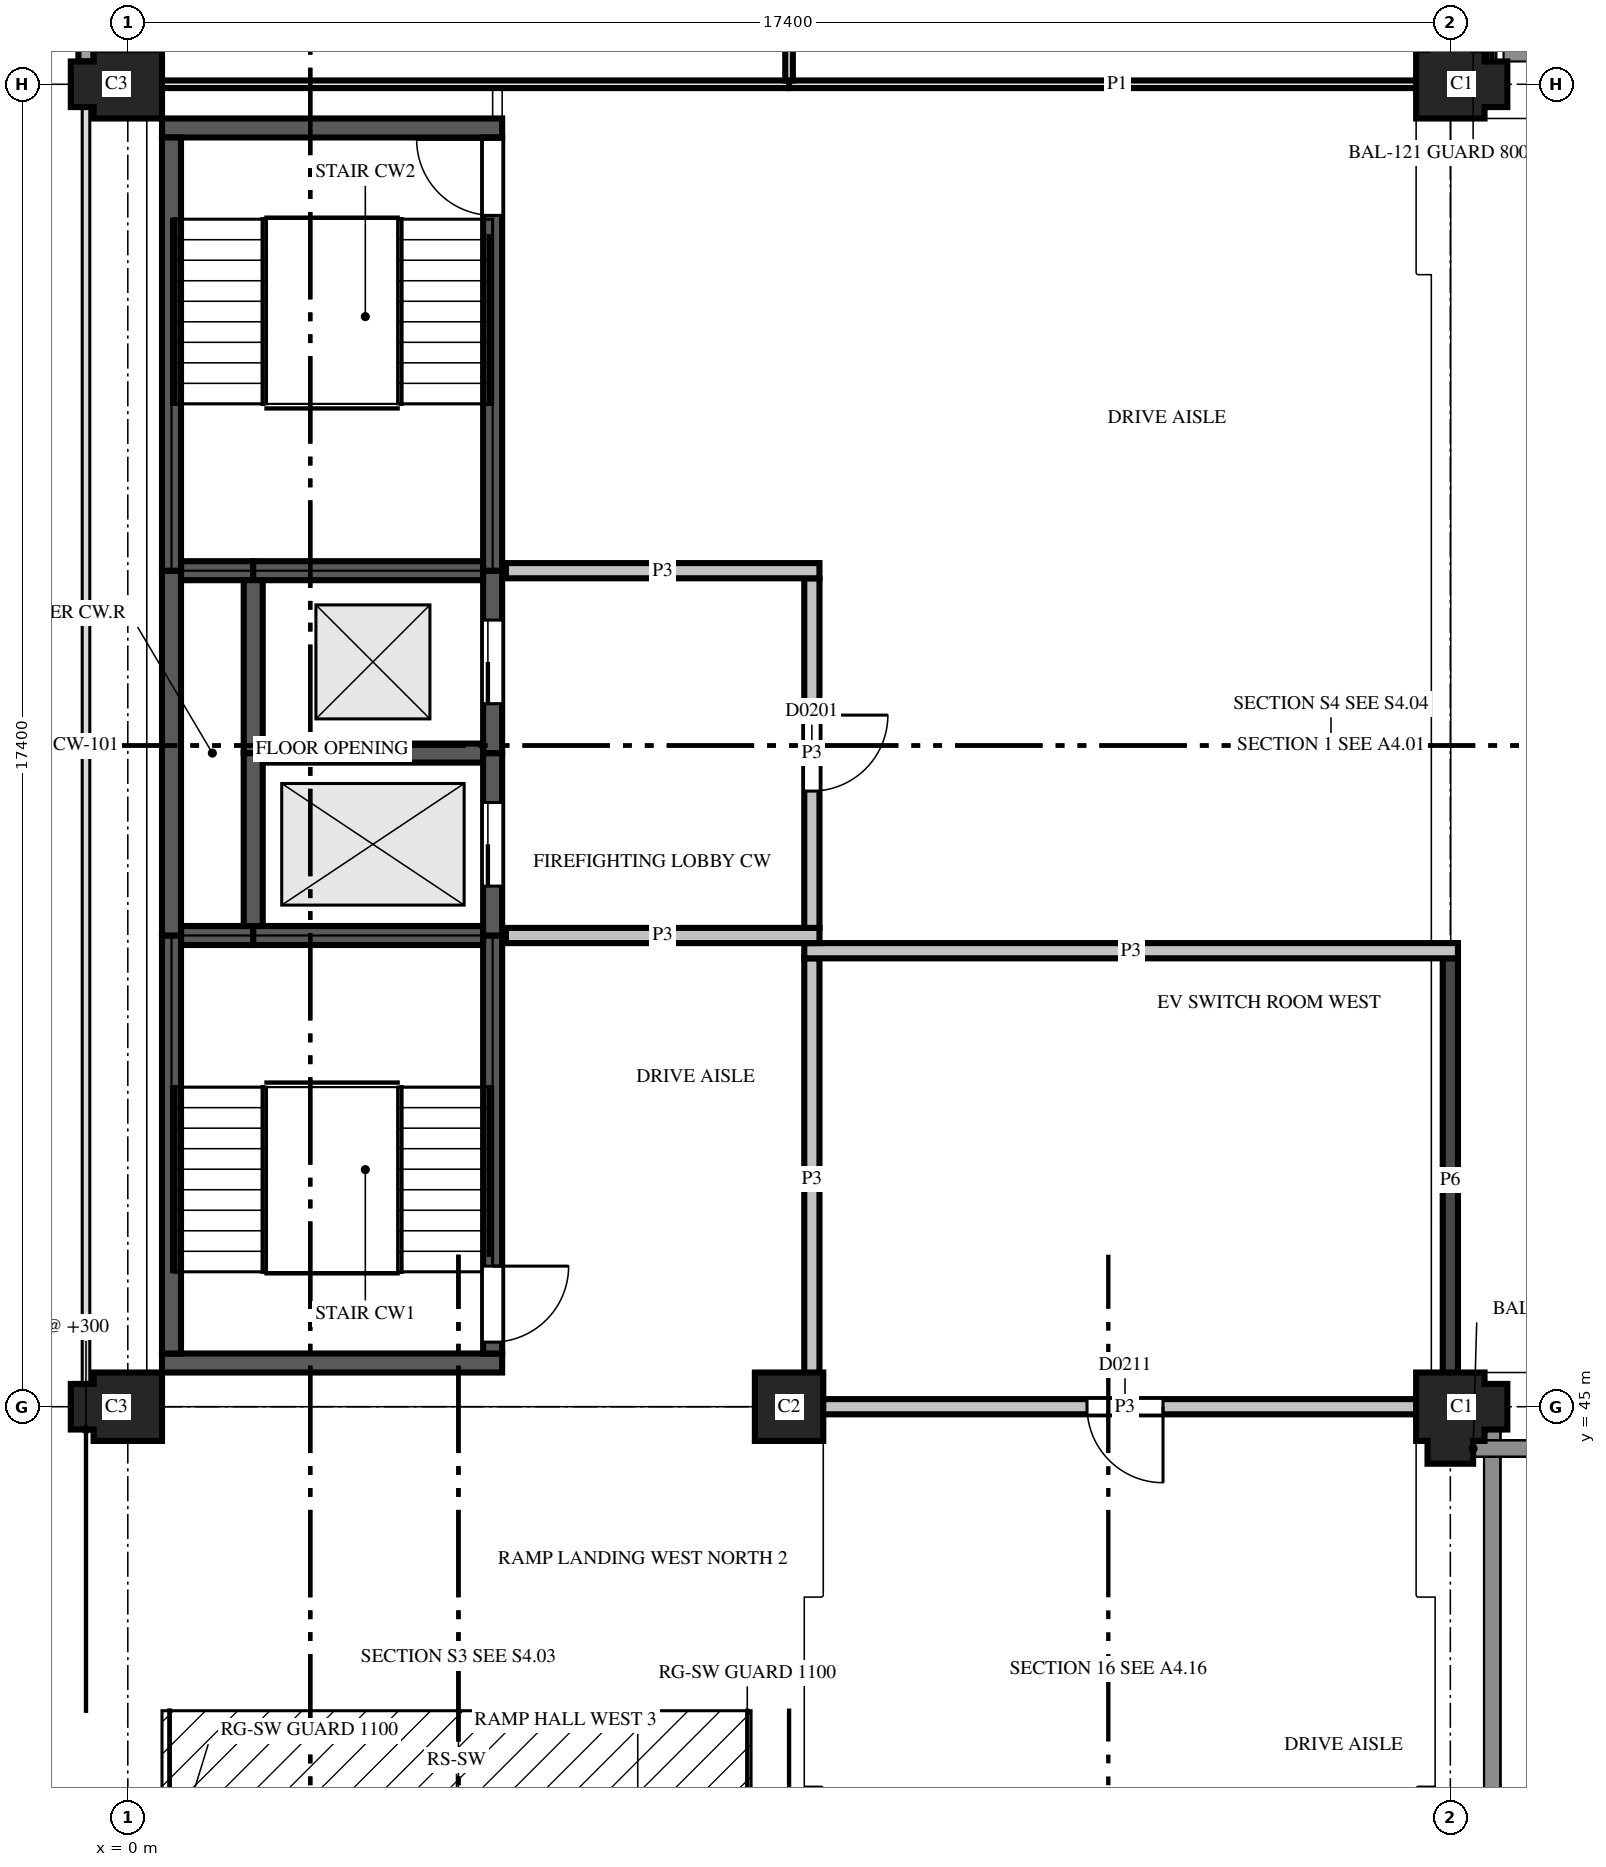
"""IFC4 building model, lengths in metres.
Left out: names, types, materials, properties, quantities, classifications, styles, units other than length and angle.
Written with IfcOpenShell. Run it as: python <this file> out.ifc"""

import sys

from ifc_helpers import new_model, si_unit, direction, frame, frame_2d, origin, place, context, subcontext, project, spatial, polyline, rectangle, outline, extrude, element, fill, save


model = new_model("IFC4")
c1 = context("Model", 3, precision=1e-05, world=origin(), true_north=direction((0.0, 1.0)))
c2 = subcontext(c1, "Body", "Model", "MODEL_VIEW")
j1 = project(units=[si_unit("LENGTHUNIT", "METRE"), si_unit("PLANEANGLEUNIT", "RADIAN")], contexts=[c1])
p1 = place(None, origin())
s1 = spatial("IfcSite", under=j1, at=p1, CompositionType="ELEMENT")
p2 = place(p1, origin())
s2 = spatial("IfcBuilding", under=s1, at=p2, CompositionType="ELEMENT")
p3 = place(p2, frame((0.0, 0.0, 8.2)))
s3 = spatial("IfcBuildingStorey", under=s2, at=p3, CompositionType="ELEMENT", Elevation=8.2)
p4 = place(p3, frame((0.0, 45.0, 0.0), z_axis=(0.0, 0.0, 1.0), x_axis=(-1.0, 0.0, 0.0)))
e1 = element("IfcColumn", 1, at=p4, inside=s3, PredefinedType="COLUMN", context=c2, shape_type="SweptSolid", body=[
    extrude(outline(polyline([(-0.45, -0.45), (0.45, -0.45), (0.45, -0.3), (0.75, -0.3), (0.75, 0.3), (0.45, 0.3), (0.45, 0.45), (-0.45, 0.45), (-0.45, -0.45)])), origin(), (0.0, 0.0, 1.0), 3.7),
])
p5 = place(p3, frame((8.7, 45.0, 0.0), z_axis=(0.0, 0.0, 1.0), x_axis=(1.0, 0.0, 0.0)))
e2 = element("IfcColumn", 2, at=p5, inside=s3, PredefinedType="COLUMN", context=c2, shape_type="SweptSolid", body=[
    extrude(outline(polyline([(-0.45, -0.45), (0.45, -0.45), (0.45, 0.45), (-0.45, 0.45), (-0.45, -0.45)])), origin(), (0.0, 0.0, 1.0), 3.7),
])
p6 = place(p3, frame((17.4, 45.0, 0.0), z_axis=(0.0, 0.0, 1.0), x_axis=(0.0, -1.0, 0.0)))
e3 = element("IfcColumn", 3, at=p6, inside=s3, PredefinedType="COLUMN", context=c2, shape_type="SweptSolid", body=[
    extrude(outline(polyline([(-0.45, -0.45), (0.45, -0.45), (0.45, -0.3), (0.75, -0.3), (0.75, 0.3), (0.45, 0.3), (0.45, 0.45), (0.3, 0.45), (0.3, 0.75), (-0.3, 0.75), (-0.3, 0.45), (-0.45, 0.45), (-0.45, -0.45)])), origin(), (0.0, 0.0, 1.0), 3.7),
])
p7 = place(p3, frame((0.0, 62.4, 0.0), z_axis=(0.0, 0.0, 1.0), x_axis=(-1.0, 0.0, 0.0)))
e4 = element("IfcColumn", 4, at=p7, inside=s3, PredefinedType="COLUMN", context=c2, shape_type="SweptSolid", body=[
    extrude(outline(polyline([(-0.45, -0.45), (0.45, -0.45), (0.45, -0.3), (0.75, -0.3), (0.75, 0.3), (0.45, 0.3), (0.45, 0.45), (-0.45, 0.45), (-0.45, -0.45)])), origin(), (0.0, 0.0, 1.0), 3.7),
])
p8 = place(p3, frame((17.4, 62.4, 0.0), z_axis=(0.0, 0.0, 1.0), x_axis=(1.0, 0.0, 0.0)))
e5 = element("IfcColumn", 5, at=p8, inside=s3, PredefinedType="COLUMN", context=c2, shape_type="SweptSolid", body=[
    extrude(outline(polyline([(-0.45, -0.45), (0.45, -0.45), (0.45, -0.3), (0.75, -0.3), (0.75, 0.3), (0.45, 0.3), (0.45, 0.45), (0.3, 0.45), (0.3, 0.75), (-0.3, 0.75), (-0.3, 0.45), (-0.45, 0.45), (-0.45, -0.45)])), origin(), (0.0, 0.0, 1.0), 3.7),
])
p9 = place(p3, frame((0.45, 45.575, 0.0), z_axis=(0.0, 0.0, 1.0), x_axis=(1.0, 0.0, 0.0)))
e6 = element("IfcWall", 6, at=p9, inside=s3, PredefinedType="SHEAR", context=c2, shape_type="SweptSolid", body=[
    extrude(rectangle(XDim=4.475, YDim=0.25, at=frame_2d((2.238, 0.0))), origin(), (0.0, 0.0, 1.0), 3.7),
])
p10 = place(p3, frame((0.7, 51.2, 0.0), z_axis=(0.0, 0.0, 1.0), x_axis=(1.0, 0.0, 0.0)))
e7 = element("IfcWall", 7, at=p10, inside=s3, PredefinedType="SHEAR", context=c2, shape_type="SweptSolid", body=[
    extrude(rectangle(XDim=0.95, YDim=0.25, at=frame_2d((0.475, 0.0))), origin(), (0.0, 0.0, 1.0), 3.7),
])
p11 = place(p3, frame((1.65, 51.2, 0.0), z_axis=(0.0, 0.0, 1.0), x_axis=(1.0, 0.0, 0.0)))
e8 = element("IfcWall", 8, at=p11, inside=s3, PredefinedType="SHEAR", context=c2, shape_type="SweptSolid", body=[
    extrude(rectangle(XDim=3.025, YDim=0.25, at=frame_2d((1.513, 0.0))), origin(), (0.0, 0.0, 1.0), 3.7),
])
p12 = place(p3, frame((1.775, 53.6, 0.0), z_axis=(0.0, 0.0, 1.0), x_axis=(1.0, 0.0, 0.0)))
e9 = element("IfcWall", 9, at=p12, inside=s3, PredefinedType="SHEAR", context=c2, shape_type="SweptSolid", body=[
    extrude(rectangle(XDim=2.9, YDim=0.25, at=frame_2d((1.45, 0.0))), origin(), (0.0, 0.0, 1.0), 3.7),
])
p13 = place(p3, frame((0.7, 56.0, 0.0), z_axis=(0.0, 0.0, 1.0), x_axis=(1.0, 0.0, 0.0)))
e10 = element("IfcWall", 10, at=p13, inside=s3, PredefinedType="SHEAR", context=c2, shape_type="SweptSolid", body=[
    extrude(rectangle(XDim=0.95, YDim=0.25, at=frame_2d((0.475, 0.0))), origin(), (0.0, 0.0, 1.0), 3.7),
])
p14 = place(p3, frame((1.65, 56.0, 0.0), z_axis=(0.0, 0.0, 1.0), x_axis=(1.0, 0.0, 0.0)))
e11 = element("IfcWall", 11, at=p14, inside=s3, PredefinedType="SHEAR", context=c2, shape_type="SweptSolid", body=[
    extrude(rectangle(XDim=3.025, YDim=0.25, at=frame_2d((1.513, 0.0))), origin(), (0.0, 0.0, 1.0), 3.7),
])
p15 = place(p3, frame((0.45, 61.825, 0.0), z_axis=(0.0, 0.0, 1.0), x_axis=(1.0, 0.0, 0.0)))
e12 = element("IfcWall", 12, at=p15, inside=s3, PredefinedType="SHEAR", context=c2, shape_type="SweptSolid", body=[
    extrude(rectangle(XDim=4.475, YDim=0.25, at=frame_2d((2.238, 0.0))), origin(), (0.0, 0.0, 1.0), 3.7),
])
p16 = place(p3, frame((0.575, 45.7, 0.0), z_axis=(0.0, 0.0, 1.0), x_axis=(0.0, 1.0, 0.0)))
e13 = element("IfcWall", 13, at=p16, inside=s3, PredefinedType="SHEAR", context=c2, shape_type="SweptSolid", body=[
    extrude(rectangle(XDim=5.5, YDim=0.25, at=frame_2d((2.75, 0.0))), origin(), (0.0, 0.0, 1.0), 3.7),
])
p17 = place(p3, frame((0.575, 51.2, 0.0), z_axis=(0.0, 0.0, 1.0), x_axis=(0.0, 1.0, 0.0)))
e14 = element("IfcWall", 14, at=p17, inside=s3, PredefinedType="SHEAR", context=c2, shape_type="SweptSolid", body=[
    extrude(rectangle(XDim=4.8, YDim=0.25, at=frame_2d((2.4, 0.0))), origin(), (0.0, 0.0, 1.0), 3.7),
])
p18 = place(p3, frame((0.575, 56.0, 0.0), z_axis=(0.0, 0.0, 1.0), x_axis=(0.0, 1.0, 0.0)))
e15 = element("IfcWall", 15, at=p18, inside=s3, PredefinedType="SHEAR", context=c2, shape_type="SweptSolid", body=[
    extrude(rectangle(XDim=5.7, YDim=0.25, at=frame_2d((2.85, 0.0))), origin(), (0.0, 0.0, 1.0), 3.7),
])
p19 = place(p3, frame((1.65, 51.325, 0.0), z_axis=(0.0, 0.0, 1.0), x_axis=(0.0, 1.0, 0.0)))
e16 = element("IfcWall", 16, at=p19, inside=s3, PredefinedType="SHEAR", context=c2, shape_type="SweptSolid", body=[
    extrude(rectangle(XDim=2.275, YDim=0.25, at=frame_2d((1.138, 0.0))), origin(), (0.0, 0.0, 1.0), 3.7),
])
p20 = place(p3, frame((1.65, 53.6, 0.0), z_axis=(0.0, 0.0, 1.0), x_axis=(0.0, 1.0, 0.0)))
e17 = element("IfcWall", 17, at=p20, inside=s3, PredefinedType="SHEAR", context=c2, shape_type="SweptSolid", body=[
    extrude(rectangle(XDim=2.275, YDim=0.25, at=frame_2d((1.137, 0.0))), origin(), (0.0, 0.0, 1.0), 3.7),
])
p21 = place(p3, frame((4.8, 45.7, 0.0), z_axis=(0.0, 0.0, 1.0), x_axis=(0.0, 1.0, 0.0)))
e18 = element("IfcWall", 18, at=p21, inside=s3, PredefinedType="SHEAR", context=c2, shape_type="SweptSolid", body=[
    extrude(rectangle(XDim=5.5, YDim=0.25, at=frame_2d((2.75, 0.0))), origin(), (0.0, 0.0, 1.0), 3.7),
])
p22 = place(p21, frame((0.15, 0.0, 0.0)))
e19 = element("IfcOpeningElement", 19, at=p22, cuts=e18, PredefinedType="OPENING", context=c2, shape_type="SweptSolid", body=[
    extrude(rectangle(XDim=1.0, YDim=2.1, at=frame_2d((0.5, 1.05))), frame((0.0, 0.135, 0.0), z_axis=(0.0, -1.0, 0.0), x_axis=(1.0, 0.0, 0.0)), (0.0, 0.0, 1.0), 0.27),
])
p23 = place(p3, frame((4.8, 51.2, 0.0), z_axis=(0.0, 0.0, 1.0), x_axis=(0.0, 1.0, 0.0)))
e20 = element("IfcWall", 20, at=p23, inside=s3, PredefinedType="SHEAR", context=c2, shape_type="SweptSolid", body=[
    extrude(rectangle(XDim=2.4, YDim=0.25, at=frame_2d((1.2, 0.0))), origin(), (0.0, 0.0, 1.0), 3.7),
])
p24 = place(p23, frame((0.65, 0.0, 0.0)))
e21 = element("IfcOpeningElement", 21, at=p24, cuts=e20, PredefinedType="OPENING", context=c2, shape_type="SweptSolid", body=[
    extrude(rectangle(XDim=1.1, YDim=2.1, at=frame_2d((0.55, 1.05))), frame((0.0, 0.135, 0.0), z_axis=(0.0, -1.0, 0.0), x_axis=(1.0, 0.0, 0.0)), (0.0, 0.0, 1.0), 0.27),
])
p25 = place(p3, frame((4.8, 53.6, 0.0), z_axis=(0.0, 0.0, 1.0), x_axis=(0.0, 1.0, 0.0)))
e22 = element("IfcWall", 22, at=p25, inside=s3, PredefinedType="SHEAR", context=c2, shape_type="SweptSolid", body=[
    extrude(rectangle(XDim=2.4, YDim=0.25, at=frame_2d((1.2, 0.0))), origin(), (0.0, 0.0, 1.0), 3.7),
])
p26 = place(p25, frame((0.65, 0.0, 0.0)))
e23 = element("IfcOpeningElement", 23, at=p26, cuts=e22, PredefinedType="OPENING", context=c2, shape_type="SweptSolid", body=[
    extrude(rectangle(XDim=1.1, YDim=2.1, at=frame_2d((0.55, 1.05))), frame((0.0, 0.135, 0.0), z_axis=(0.0, -1.0, 0.0), x_axis=(1.0, 0.0, 0.0)), (0.0, 0.0, 1.0), 0.27),
])
p27 = place(p3, frame((4.8, 56.0, 0.0), z_axis=(0.0, 0.0, 1.0), x_axis=(0.0, 1.0, 0.0)))
e24 = element("IfcWall", 24, at=p27, inside=s3, PredefinedType="SHEAR", context=c2, shape_type="SweptSolid", body=[
    extrude(rectangle(XDim=5.7, YDim=0.25, at=frame_2d((2.85, 0.0))), origin(), (0.0, 0.0, 1.0), 3.7),
])
p28 = place(p27, frame((4.675, 0.0, 0.0)))
e25 = element("IfcOpeningElement", 25, at=p28, cuts=e24, PredefinedType="OPENING", context=c2, shape_type="SweptSolid", body=[
    extrude(rectangle(XDim=1.0, YDim=2.1, at=frame_2d((0.5, 1.05))), frame((0.0, 0.135, 0.0), z_axis=(0.0, -1.0, 0.0), x_axis=(1.0, 0.0, 0.0)), (0.0, 0.0, 1.0), 0.27),
])
p29 = place(p3, frame((-0.55, 69.6, 0.0), z_axis=(0.0, 0.0, 1.0), x_axis=(0.0, -1.0, 0.0)))
e26 = element("IfcWall", 26, at=p29, inside=s3, PredefinedType="SOLIDWALL", context=c2, shape_type="SweptSolid", body=[
    extrude(rectangle(XDim=6.9, YDim=0.2, at=frame_2d((3.45, 0.0))), origin(), (0.0, 0.0, 1.0), 2.3),
])
p30 = place(p29, frame((2.25, 0.0, 0.55)))
e27 = element("IfcOpeningElement", 27, at=p30, cuts=e26, PredefinedType="OPENING", context=c2, shape_type="SweptSolid", body=[
    extrude(rectangle(XDim=2.4, YDim=1.0, at=frame_2d((1.2, 0.5))), frame((0.0, 0.11, 0.0), z_axis=(0.0, -1.0, 0.0), x_axis=(1.0, 0.0, 0.0)), (0.0, 0.0, 1.0), 0.22),
])
p31 = place(p3, frame((8.9, 45.0, 0.0), z_axis=(0.0, 0.0, 1.0), x_axis=(1.0, 0.0, 0.0)))
e28 = element("IfcWall", 28, at=p31, inside=s3, PredefinedType="PARTITIONING", context=c2, shape_type="SweptSolid", body=[
    extrude(rectangle(XDim=8.44, YDim=0.2, at=frame_2d((4.22, 0.0))), origin(), (0.0, 0.0, 1.0), 2.88),
])
p32 = place(p31, frame((3.72, 0.0, 0.0)))
e29 = element("IfcOpeningElement", 29, at=p32, cuts=e28, PredefinedType="OPENING", context=c2, shape_type="SweptSolid", body=[
    extrude(rectangle(XDim=1.0, YDim=2.1, at=frame_2d((0.5, 1.05))), frame((0.0, 0.11, 0.0), z_axis=(0.0, -1.0, 0.0), x_axis=(1.0, 0.0, 0.0)), (0.0, 0.0, 1.0), 0.22),
])
p33 = place(p3, frame((17.4, 45.06, 0.0), z_axis=(0.0, 0.0, 1.0), x_axis=(0.0, 1.0, 0.0)))
e30 = element("IfcWall", 30, at=p33, inside=s3, PredefinedType="PARTITIONING", context=c2, shape_type="SweptSolid", body=[
    extrude(rectangle(XDim=5.84, YDim=0.2, at=frame_2d((2.92, 0.0))), origin(), (0.0, 0.0, 1.0), 2.2),
])
p34 = place(p3, frame((9.0, 50.9, 0.0), z_axis=(0.0, 0.0, 1.0), x_axis=(0.0, -1.0, 0.0)))
e31 = element("IfcWall", 31, at=p34, inside=s3, PredefinedType="PARTITIONING", context=c2, shape_type="SweptSolid", body=[
    extrude(rectangle(XDim=5.8, YDim=0.2, at=frame_2d((2.9, 0.0))), origin(), (0.0, 0.0, 1.0), 2.88),
])
p35 = place(p3, frame((17.5, 51.0, 0.0), z_axis=(0.0, 0.0, 1.0), x_axis=(-1.0, 0.0, 0.0)))
e32 = element("IfcWall", 32, at=p35, inside=s3, PredefinedType="PARTITIONING", context=c2, shape_type="SweptSolid", body=[
    extrude(rectangle(XDim=8.6, YDim=0.2, at=frame_2d((4.3, 0.0))), origin(), (0.0, 0.0, 1.0), 2.88),
])
p36 = place(p3, frame((4.975, 51.2, 0.0), z_axis=(0.0, 0.0, 1.0), x_axis=(1.0, 0.0, 0.0)))
e33 = element("IfcWall", 33, at=p36, inside=s3, PredefinedType="PARTITIONING", context=c2, shape_type="SweptSolid", body=[
    extrude(rectangle(XDim=4.125, YDim=0.2, at=frame_2d((2.062, 0.0))), origin(), (0.0, 0.0, 1.0), 2.88),
])
p37 = place(p3, frame((9.0, 51.3, 0.0), z_axis=(0.0, 0.0, 1.0), x_axis=(0.0, 1.0, 0.0)))
e34 = element("IfcWall", 34, at=p37, inside=s3, PredefinedType="PARTITIONING", context=c2, shape_type="SweptSolid", body=[
    extrude(rectangle(XDim=4.6, YDim=0.2, at=frame_2d((2.3, 0.0))), origin(), (0.0, 0.0, 1.0), 2.88),
])
p38 = place(p37, frame((1.8, 0.0, 0.0)))
e35 = element("IfcOpeningElement", 35, at=p38, cuts=e34, PredefinedType="OPENING", context=c2, shape_type="SweptSolid", body=[
    extrude(rectangle(XDim=1.0, YDim=2.1, at=frame_2d((0.5, 1.05))), frame((0.0, 0.11, 0.0), z_axis=(0.0, -1.0, 0.0), x_axis=(1.0, 0.0, 0.0)), (0.0, 0.0, 1.0), 0.22),
])
p39 = place(p3, frame((9.1, 56.0, 0.0), z_axis=(0.0, 0.0, 1.0), x_axis=(-1.0, 0.0, 0.0)))
e36 = element("IfcWall", 36, at=p39, inside=s3, PredefinedType="PARTITIONING", context=c2, shape_type="SweptSolid", body=[
    extrude(rectangle(XDim=4.125, YDim=0.2, at=frame_2d((2.062, 0.0))), origin(), (0.0, 0.0, 1.0), 2.88),
])
p40 = place(p3, frame((0.06, 62.4, 0.0), z_axis=(0.0, 0.0, 1.0), x_axis=(1.0, 0.0, 0.0)))
e37 = element("IfcWall", 37, at=p40, inside=s3, PredefinedType="PARTITIONING", context=c2, shape_type="SweptSolid", body=[
    extrude(rectangle(XDim=8.64, YDim=0.1, at=frame_2d((4.32, 0.0))), origin(), (0.0, 0.0, 1.0), 2.88),
])
p41 = place(p3, frame((8.7, 62.4, 0.0), z_axis=(0.0, 0.0, 1.0), x_axis=(1.0, 0.0, 0.0)))
e38 = element("IfcWall", 38, at=p41, inside=s3, PredefinedType="PARTITIONING", context=c2, shape_type="SweptSolid", body=[
    extrude(rectangle(XDim=8.64, YDim=0.1, at=frame_2d((4.32, 0.0))), origin(), (0.0, 0.0, 1.0), 2.88),
])
p42 = place(p3, frame((8.7, 62.45, 0.0), z_axis=(0.0, 0.0, 1.0), x_axis=(0.0, 1.0, 0.0)))
e39 = element("IfcWall", 39, at=p42, inside=s3, PredefinedType="PARTITIONING", context=c2, shape_type="SweptSolid", body=[
    extrude(rectangle(XDim=22.4, YDim=0.1, at=frame_2d((11.2, 0.0))), origin(), (0.0, 0.0, 1.0), 2.88),
])
p43 = place(p38, origin())
e40 = element("IfcDoor", 40, at=p43, inside=s3, OperationType="SINGLE_SWING_RIGHT", PredefinedType="DOOR", context=c2, shape_type="SweptSolid", body=[
    extrude(rectangle(XDim=1.0, YDim=2.1, at=frame_2d((0.5, 1.05))), frame((0.0, 0.025, 0.0), z_axis=(0.0, -1.0, 0.0), x_axis=(1.0, 0.0, 0.0)), (0.0, 0.0, 1.0), 0.05),
])
fill(e35, e40)
p44 = place(p32, origin())
e41 = element("IfcDoor", 41, at=p44, inside=s3, OperationType="SINGLE_SWING_RIGHT", PredefinedType="DOOR", context=c2, shape_type="SweptSolid", body=[
    extrude(rectangle(XDim=1.0, YDim=2.1, at=frame_2d((0.5, 1.05))), frame((0.0, 0.025, 0.0), z_axis=(0.0, -1.0, 0.0), x_axis=(1.0, 0.0, 0.0)), (0.0, 0.0, 1.0), 0.05),
])
fill(e29, e41)
p45 = place(p24, origin())
e42 = element("IfcDoor", 42, at=p45, inside=s3, OperationType="SLIDING_TO_LEFT", PredefinedType="DOOR", context=c2, shape_type="SweptSolid", body=[
    extrude(rectangle(XDim=1.1, YDim=2.1, at=frame_2d((0.55, 1.05))), frame((0.0, 0.025, 0.0), z_axis=(0.0, -1.0, 0.0), x_axis=(1.0, 0.0, 0.0)), (0.0, 0.0, 1.0), 0.05),
])
fill(e21, e42)
p46 = place(p26, origin())
e43 = element("IfcDoor", 43, at=p46, inside=s3, OperationType="SLIDING_TO_LEFT", PredefinedType="DOOR", context=c2, shape_type="SweptSolid", body=[
    extrude(rectangle(XDim=1.1, YDim=2.1, at=frame_2d((0.55, 1.05))), frame((0.0, 0.025, 0.0), z_axis=(0.0, -1.0, 0.0), x_axis=(1.0, 0.0, 0.0)), (0.0, 0.0, 1.0), 0.05),
])
fill(e23, e43)
p47 = place(p28, origin())
e44 = element("IfcDoor", 44, at=p47, inside=s3, OperationType="SINGLE_SWING_LEFT", PredefinedType="DOOR", context=c2, shape_type="SweptSolid", body=[
    extrude(rectangle(XDim=1.0, YDim=2.1, at=frame_2d((0.5, 1.05))), frame((0.0, 0.025, 0.0), z_axis=(0.0, -1.0, 0.0), x_axis=(1.0, 0.0, 0.0)), (0.0, 0.0, 1.0), 0.05),
])
fill(e25, e44)
p48 = place(p22, origin())
e45 = element("IfcDoor", 45, at=p48, inside=s3, OperationType="SINGLE_SWING_RIGHT", PredefinedType="DOOR", context=c2, shape_type="SweptSolid", body=[
    extrude(rectangle(XDim=1.0, YDim=2.1, at=frame_2d((0.5, 1.05))), frame((0.0, 0.025, 0.0), z_axis=(0.0, -1.0, 0.0), x_axis=(1.0, 0.0, 0.0)), (0.0, 0.0, 1.0), 0.05),
])
fill(e19, e45)
save(model, sys.argv[1])
